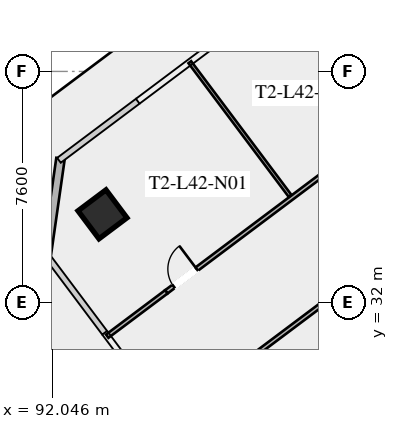
"""IFC4 building model, lengths in metres.
Left out: names, types, materials, properties, quantities, classifications, styles, units other than length and angle.
Written with IfcOpenShell. Run it as: python <this file> out.ifc"""

import sys

from ifc_helpers import new_model, si_unit, direction, frame, frame_2d, origin, origin_2d, place, context, subcontext, project, spatial, rectangle, hollow_rectangle, extrude, element, fill, save


model = new_model("IFC4")
c1 = context("Model", 3, precision=1e-05, world=origin(), true_north=direction((0.0, 1.0)))
c2 = subcontext(c1, "Body", "Model", "MODEL_VIEW")
j1 = project(units=[si_unit("LENGTHUNIT", "METRE"), si_unit("PLANEANGLEUNIT", "RADIAN")], contexts=[c1])
p1 = place(None, origin())
s1 = spatial("IfcSite", under=j1, at=p1, CompositionType="ELEMENT")
p2 = place(p1, origin())
s2 = spatial("IfcBuilding", under=s1, at=p2, CompositionType="ELEMENT")
p3 = place(p2, frame((0.0, 0.0, 157.0)))
s3 = spatial("IfcBuildingStorey", under=s2, at=p3, CompositionType="ELEMENT", Elevation=157.0)
p4 = place(p3, frame((93.7, 34.9, -0.175), z_axis=(0.0, 0.0, 1.0), x_axis=(0.799999996291, 0.600000004945, 0.0)))
e1 = element("IfcColumn", 1, at=p4, inside=s3, PredefinedType="COLUMN", context=c2, shape_type="SweptSolid", body=[
    extrude(hollow_rectangle(XDim=1.15, YDim=1.15, WallThickness=0.045, at=origin_2d()), origin(), (0.0, 0.0, 1.0), 3.545),
])
p5 = place(p3, frame((91.86, 33.52, 0.0), z_axis=(0.0, 0.0, 1.0), x_axis=(0.141410847992, 0.989950994782, 0.0)))
e2 = element("IfcWall", 2, at=p5, inside=s3, PredefinedType="SOLIDWALL", context=c2, shape_type="SweptSolid", body=[
    extrude(rectangle(XDim=3.253, YDim=0.28, at=frame_2d((1.626, 0.0))), origin(), (0.0, 0.0, 1.0), 3.37),
])
p6 = place(p3, frame((95.8, 32.35, 0.0), z_axis=(0.0, 0.0, 1.0), x_axis=(0.8, 0.6, 0.0)))
e3 = element("IfcWall", 3, at=p6, inside=s3, PredefinedType="PARTITIONING", context=c2, shape_type="SweptSolid", body=[
    extrude(rectangle(XDim=28.7, YDim=0.135, at=frame_2d((14.35, 0.0))), origin(), (0.0, 0.0, 1.0), 2.723),
])
p7 = place(p6, frame((0.3, 0.0, 0.0)))
e4 = element("IfcOpeningElement", 4, at=p7, cuts=e3, PredefinedType="OPENING", context=c2, shape_type="SweptSolid", body=[
    extrude(rectangle(XDim=0.95, YDim=2.05, at=frame_2d((0.475, 1.025))), frame((0.0, 0.077, 0.0), z_axis=(0.0, -1.0, 0.0), x_axis=(1.0, 0.0, 0.0)), (0.0, 0.0, 1.0), 0.155),
])
p8 = place(p6, frame((9.959, 0.0, 0.0)))
e5 = element("IfcOpeningElement", 5, at=p8, cuts=e3, PredefinedType="OPENING", context=c2, shape_type="SweptSolid", body=[
    extrude(rectangle(XDim=0.95, YDim=2.05, at=frame_2d((0.475, 1.025))), frame((0.0, 0.077, 0.0), z_axis=(0.0, -1.0, 0.0), x_axis=(1.0, 0.0, 0.0)), (0.0, 0.0, 1.0), 0.155),
])
p9 = place(p6, frame((14.005, 0.0, 0.0)))
e6 = element("IfcOpeningElement", 6, at=p9, cuts=e3, PredefinedType="OPENING", context=c2, shape_type="SweptSolid", body=[
    extrude(rectangle(XDim=0.95, YDim=2.05, at=frame_2d((0.475, 1.025))), frame((0.0, 0.077, 0.0), z_axis=(0.0, -1.0, 0.0), x_axis=(1.0, 0.0, 0.0)), (0.0, 0.0, 1.0), 0.155),
])
p10 = place(p6, frame((18.049, 0.0, 0.0)))
e7 = element("IfcOpeningElement", 7, at=p10, cuts=e3, PredefinedType="OPENING", context=c2, shape_type="SweptSolid", body=[
    extrude(rectangle(XDim=0.95, YDim=2.05, at=frame_2d((0.475, 1.025))), frame((0.0, 0.077, 0.0), z_axis=(0.0, -1.0, 0.0), x_axis=(1.0, 0.0, 0.0)), (0.0, 0.0, 1.0), 0.155),
])
p11 = place(p6, frame((27.45, 0.0, 0.0)))
e8 = element("IfcOpeningElement", 8, at=p11, cuts=e3, PredefinedType="OPENING", context=c2, shape_type="SweptSolid", body=[
    extrude(rectangle(XDim=0.95, YDim=2.05, at=frame_2d((0.475, 1.025))), frame((0.0, 0.077, 0.0), z_axis=(0.0, -1.0, 0.0), x_axis=(1.0, 0.0, 0.0)), (0.0, 0.0, 1.0), 0.155),
])
p12 = place(p3, frame((93.856, 30.892, 0.0), z_axis=(0.0, 0.0, 1.0), x_axis=(0.800012055778, 0.599983925293, 0.0)))
e9 = element("IfcWall", 9, at=p12, inside=s3, PredefinedType="PARTITIONING", context=c2, shape_type="SweptSolid", body=[
    extrude(rectangle(XDim=2.43, YDim=0.135, at=frame_2d((1.215, 0.0))), origin(), (0.0, 0.0, 1.0), 2.723),
])
p13 = place(p3, frame((99.872, 35.504, 0.0), z_axis=(0.0, 0.0, 1.0), x_axis=(-0.599992897893, 0.800005326531, 0.0)))
e10 = element("IfcWall", 10, at=p13, inside=s3, PredefinedType="PARTITIONING", context=c2, shape_type="SweptSolid", body=[
    extrude(rectangle(XDim=5.5, YDim=0.11, at=frame_2d((2.75, 0.0))), origin(), (0.0, 0.0, 1.0), 2.723),
])
p14 = place(p3, frame((102.728, 33.296, 0.0), z_axis=(0.0, 0.0, 1.0), x_axis=(-0.800013722153, -0.59998170336, 0.0)))
e11 = element("IfcWall", 11, at=p14, inside=s3, PredefinedType="PARTITIONING", context=c2, shape_type="SweptSolid", body=[
    extrude(rectangle(XDim=8.54, YDim=0.135, at=frame_2d((4.27, 0.0))), origin(), (0.0, 0.0, 1.0), 2.723),
])
p15 = place(p14, frame((0.5, 0.0, 0.0)))
e12 = element("IfcOpeningElement", 12, at=p15, cuts=e11, PredefinedType="OPENING", context=c2, shape_type="SweptSolid", body=[
    extrude(rectangle(XDim=0.95, YDim=2.05, at=frame_2d((0.475, 1.025))), frame((0.0, 0.077, 0.0), z_axis=(0.0, -1.0, 0.0), x_axis=(1.0, 0.0, 0.0)), (0.0, 0.0, 1.0), 0.155),
])
p16 = place(p7, origin())
e13 = element("IfcDoor", 13, at=p16, inside=s3, OperationType="SINGLE_SWING_RIGHT", PredefinedType="DOOR", context=c2, shape_type="SweptSolid", body=[
    extrude(rectangle(XDim=0.95, YDim=2.05, at=frame_2d((0.475, 1.025))), frame((0.0, 0.025, 0.0), z_axis=(0.0, -1.0, 0.0), x_axis=(1.0, 0.0, 0.0)), (0.0, 0.0, 1.0), 0.05),
])
fill(e4, e13)
save(model, sys.argv[1])
